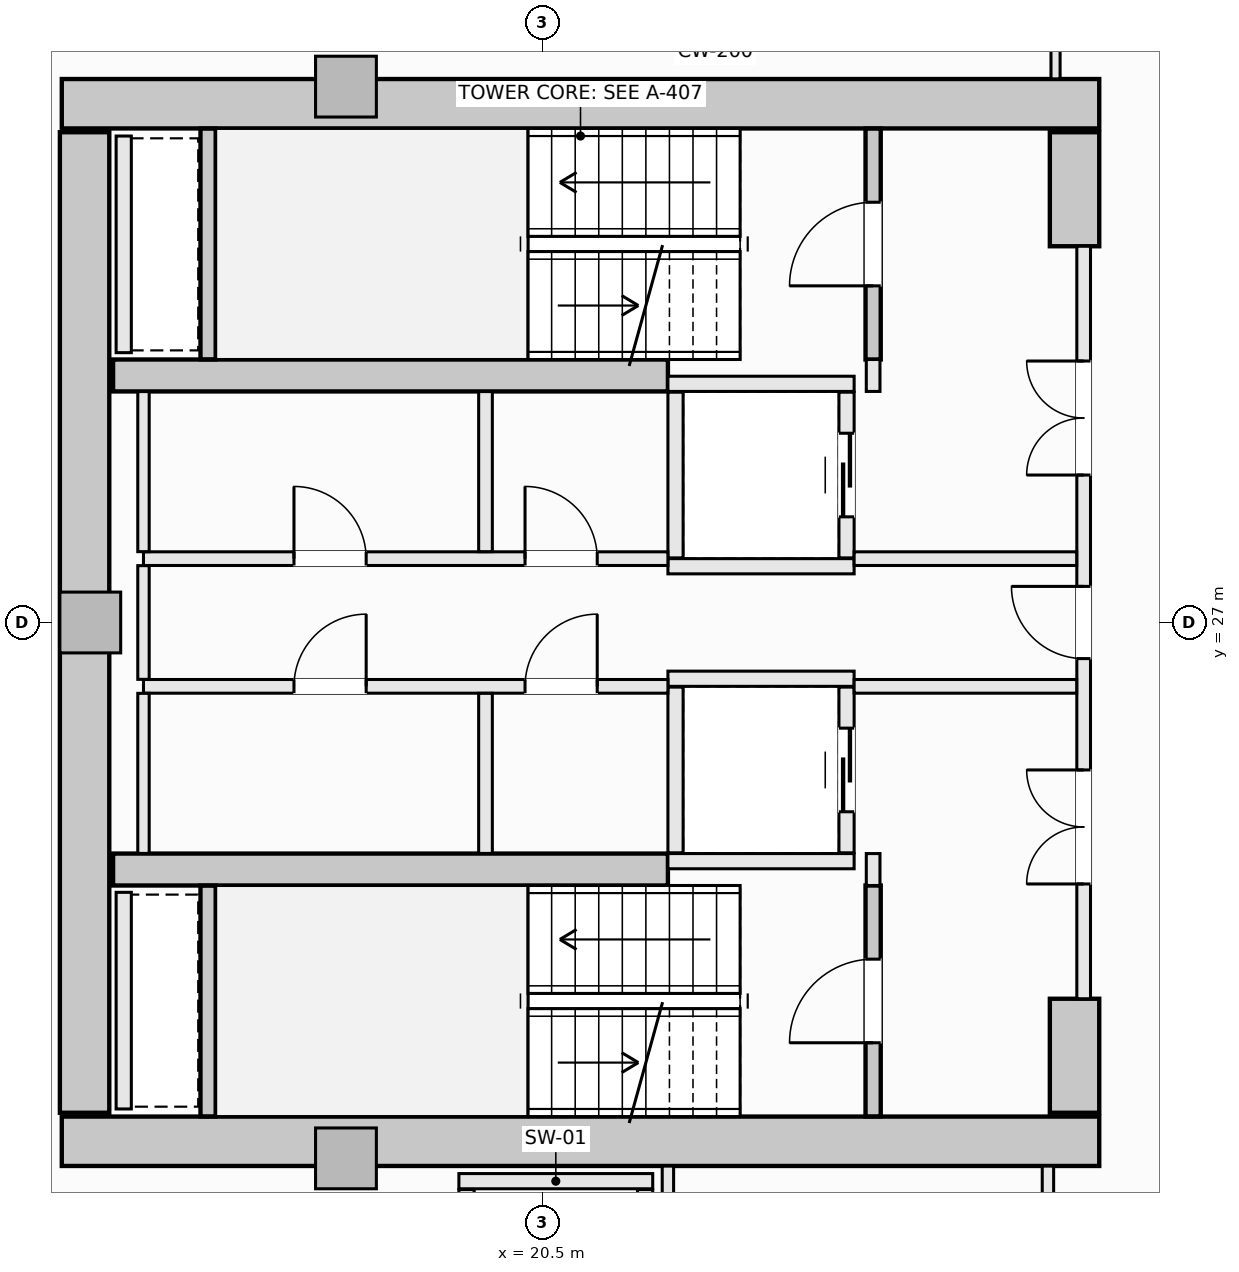
"""IFC4 building model, lengths in metres.
Left out: names, types, materials, properties, quantities, classifications, styles, units other than length and angle.
Written with IfcOpenShell. Run it as: python <this file> out.ifc"""

import sys

from ifc_helpers import new_model, si_unit, direction, frame, frame_2d, origin, origin_2d, place, context, subcontext, project, spatial, rectangle, extrude, element, fill, save


model = new_model("IFC4")
c1 = context("Model", 3, precision=1e-05, world=origin(), true_north=direction((0.0, 1.0)))
c2 = subcontext(c1, "Body", "Model", "MODEL_VIEW")
j1 = project(units=[si_unit("LENGTHUNIT", "METRE"), si_unit("PLANEANGLEUNIT", "RADIAN")], contexts=[c1])
p1 = place(None, origin())
s1 = spatial("IfcSite", under=j1, at=p1, CompositionType="ELEMENT")
p2 = place(p1, origin())
s2 = spatial("IfcBuilding", under=s1, at=p2, CompositionType="ELEMENT")
p3 = place(p2, frame((0.0, 0.0, 105.3)))
s3 = spatial("IfcBuildingStorey", under=s2, at=p3, CompositionType="ELEMENT", Elevation=105.3)
for number, where, z_axis, x_axis in (
    (1, (14.175, 33.825, -0.27), (0.0, 0.0, 1.0), (1.0, 0.0, 0.0)),
    (2, (14.175, 20.175, -0.27), (0.0, 0.0, 1.0), (1.0, 0.0, 0.0)),
):
    element("IfcWall", number, at=place(p3, frame(where, z_axis=z_axis, x_axis=x_axis)), inside=s3, PredefinedType="SHEAR", context=c2, shape_type="SweptSolid", body=[
        extrude(rectangle(XDim=13.65, YDim=0.65, at=frame_2d((6.825, 0.0))), origin(), (0.0, 0.0, 1.0), 3.4),
    ])
p4 = place(p3, frame((14.475, 20.55, -0.27), z_axis=(0.0, 0.0, 1.0), x_axis=(0.0, 1.0, 0.0)))
e3 = element("IfcWall", 3, at=p4, inside=s3, PredefinedType="SHEAR", context=c2, shape_type="SweptSolid", body=[
    extrude(rectangle(XDim=12.9, YDim=0.65, at=frame_2d((6.45, 0.0))), origin(), (0.0, 0.0, 1.0), 3.4),
])
for number, where, z_axis, x_axis in (
    (4, (27.5, 31.95, -0.27), (0.0, 0.0, 1.0), (0.0, 1.0, 0.0)),
    (5, (27.5, 20.55, -0.27), (0.0, 0.0, 1.0), (0.0, 1.0, 0.0)),
):
    element("IfcWall", number, at=place(p3, frame(where, z_axis=z_axis, x_axis=x_axis)), inside=s3, PredefinedType="SHEAR", context=c2, shape_type="SweptSolid", body=[
        extrude(rectangle(XDim=1.5, YDim=0.65, at=frame_2d((0.75, 0.0))), origin(), (0.0, 0.0, 1.0), 3.4),
    ])
for number, where, z_axis, x_axis in (
    (6, (14.85, 30.25, -0.27), (0.0, 0.0, 1.0), (1.0, 0.0, 0.0)),
    (7, (14.85, 23.75, -0.27), (0.0, 0.0, 1.0), (1.0, 0.0, 0.0)),
):
    element("IfcWall", number, at=place(p3, frame(where, z_axis=z_axis, x_axis=x_axis)), inside=s3, PredefinedType="SHEAR", context=c2, shape_type="SweptSolid", body=[
        extrude(rectangle(XDim=7.3, YDim=0.42, at=frame_2d((3.65, 0.0))), origin(), (0.0, 0.0, 1.0), 3.4),
    ])
for number, where, z_axis, x_axis in (
    (8, (17.914, 34.05, -0.27), (0.0, 0.0, 1.0), (1.0, 0.0, 0.0)),
    (9, (14.55, 27.0, -0.27), (0.0, 0.0, 1.0), (1.0, 0.0, 0.0)),
    (10, (17.914, 19.95, -0.27), (0.0, 0.0, 1.0), (1.0, 0.0, 0.0)),
):
    element("IfcColumn", number, at=place(p3, frame(where, z_axis=z_axis, x_axis=x_axis)), inside=s3, PredefinedType="PILASTER", context=c2, shape_type="SweptSolid", body=[
        extrude(rectangle(XDim=0.8, YDim=0.8, at=origin_2d()), origin(), (0.0, 0.0, 1.0), 3.4),
    ])
p5 = place(p3, frame((24.85, 30.46, -0.27), z_axis=(0.0, 0.0, 1.0), x_axis=(0.0, 1.0, 0.0)))
e11 = element("IfcWall", 11, at=p5, inside=s3, PredefinedType="SHEAR", context=c2, shape_type="SweptSolid", body=[
    extrude(rectangle(XDim=3.038, YDim=0.2, at=frame_2d((1.519, 0.0))), origin(), (0.0, 0.0, 1.0), 3.4),
])
p6 = place(p5, frame((0.969, 0.0, 0.27)))
e12 = element("IfcOpeningElement", 12, at=p6, cuts=e11, PredefinedType="OPENING", context=c2, shape_type="SweptSolid", body=[
    extrude(rectangle(XDim=1.1, YDim=2.15, at=frame_2d((0.55, 1.075))), frame((0.0, 0.11, 0.0), z_axis=(0.0, -1.0, 0.0), x_axis=(1.0, 0.0, 0.0)), (0.0, 0.0, 1.0), 0.22),
])
p7 = place(p3, frame((16.1, 30.462, -0.27), z_axis=(0.0, 0.0, 1.0), x_axis=(0.0, 1.0, 0.0)))
e13 = element("IfcWall", 13, at=p7, inside=s3, PredefinedType="SHEAR", context=c2, shape_type="SweptSolid", body=[
    extrude(rectangle(XDim=3.036, YDim=0.2, at=frame_2d((1.518, 0.0))), origin(), (0.0, 0.0, 1.0), 3.4),
])
p8 = place(p3, frame((24.85, 20.502, -0.27), z_axis=(0.0, 0.0, 1.0), x_axis=(0.0, 1.0, 0.0)))
e14 = element("IfcWall", 14, at=p8, inside=s3, PredefinedType="SHEAR", context=c2, shape_type="SweptSolid", body=[
    extrude(rectangle(XDim=3.038, YDim=0.2, at=frame_2d((1.519, 0.0))), origin(), (0.0, 0.0, 1.0), 3.4),
])
p9 = place(p8, frame((0.969, 0.0, 0.27)))
e15 = element("IfcOpeningElement", 15, at=p9, cuts=e14, PredefinedType="OPENING", context=c2, shape_type="SweptSolid", body=[
    extrude(rectangle(XDim=1.1, YDim=2.15, at=frame_2d((0.55, 1.075))), frame((0.0, 0.11, 0.0), z_axis=(0.0, -1.0, 0.0), x_axis=(1.0, 0.0, 0.0)), (0.0, 0.0, 1.0), 0.22),
])
p10 = place(p3, frame((16.1, 20.502, -0.27), z_axis=(0.0, 0.0, 1.0), x_axis=(0.0, 1.0, 0.0)))
e16 = element("IfcWall", 16, at=p10, inside=s3, PredefinedType="SHEAR", context=c2, shape_type="SweptSolid", body=[
    extrude(rectangle(XDim=3.036, YDim=0.2, at=frame_2d((1.518, 0.0))), origin(), (0.0, 0.0, 1.0), 3.4),
])
for number, where, z_axis, x_axis in (
    (17, (22.15, 30.14, 0.0), (0.0, 0.0, 1.0), (1.0, 0.0, 0.0)),
    (18, (22.15, 27.74, 0.0), (0.0, 0.0, 1.0), (1.0, 0.0, 0.0)),
):
    element("IfcWall", number, at=place(p3, frame(where, z_axis=z_axis, x_axis=x_axis)), inside=s3, PredefinedType="SOLIDWALL", context=c2, shape_type="SweptSolid", body=[
        extrude(rectangle(XDim=2.45, YDim=0.2, at=frame_2d((1.225, 0.0))), origin(), (0.0, 0.0, 1.0), 3.13),
    ])
p11 = place(p3, frame((22.25, 27.85, 0.0), z_axis=(0.0, 0.0, 1.0), x_axis=(0.0, 1.0, 0.0)))
e19 = element("IfcWall", 19, at=p11, inside=s3, PredefinedType="SOLIDWALL", context=c2, shape_type="SweptSolid", body=[
    extrude(rectangle(XDim=2.18, YDim=0.2, at=frame_2d((1.09, 0.0))), origin(), (0.0, 0.0, 1.0), 3.13),
])
p12 = place(p3, frame((24.5, 27.85, 0.0), z_axis=(0.0, 0.0, 1.0), x_axis=(0.0, 1.0, 0.0)))
e20 = element("IfcWall", 20, at=p12, inside=s3, PredefinedType="SOLIDWALL", context=c2, shape_type="SweptSolid", body=[
    extrude(rectangle(XDim=2.18, YDim=0.2, at=frame_2d((1.09, 0.0))), origin(), (0.0, 0.0, 1.0), 3.13),
])
p13 = place(p12, frame((0.54, 0.0, 0.0)))
e21 = element("IfcOpeningElement", 21, at=p13, cuts=e20, PredefinedType="OPENING", context=c2, shape_type="SweptSolid", body=[
    extrude(rectangle(XDim=1.1, YDim=2.2, at=frame_2d((0.55, 1.1))), frame((0.0, 0.11, 0.0), z_axis=(0.0, -1.0, 0.0), x_axis=(1.0, 0.0, 0.0)), (0.0, 0.0, 1.0), 0.22),
])
for number, where, z_axis, x_axis in (
    (22, (22.15, 26.26, 0.0), (0.0, 0.0, 1.0), (1.0, 0.0, 0.0)),
    (23, (22.15, 23.86, 0.0), (0.0, 0.0, 1.0), (1.0, 0.0, 0.0)),
):
    element("IfcWall", number, at=place(p3, frame(where, z_axis=z_axis, x_axis=x_axis)), inside=s3, PredefinedType="SOLIDWALL", context=c2, shape_type="SweptSolid", body=[
        extrude(rectangle(XDim=2.45, YDim=0.2, at=frame_2d((1.225, 0.0))), origin(), (0.0, 0.0, 1.0), 3.13),
    ])
p14 = place(p3, frame((22.25, 23.97, 0.0), z_axis=(0.0, 0.0, 1.0), x_axis=(0.0, 1.0, 0.0)))
e24 = element("IfcWall", 24, at=p14, inside=s3, PredefinedType="SOLIDWALL", context=c2, shape_type="SweptSolid", body=[
    extrude(rectangle(XDim=2.18, YDim=0.2, at=frame_2d((1.09, 0.0))), origin(), (0.0, 0.0, 1.0), 3.13),
])
p15 = place(p3, frame((24.5, 23.97, 0.0), z_axis=(0.0, 0.0, 1.0), x_axis=(0.0, 1.0, 0.0)))
e25 = element("IfcWall", 25, at=p15, inside=s3, PredefinedType="SOLIDWALL", context=c2, shape_type="SweptSolid", body=[
    extrude(rectangle(XDim=2.18, YDim=0.2, at=frame_2d((1.09, 0.0))), origin(), (0.0, 0.0, 1.0), 3.13),
])
p16 = place(p15, frame((0.54, 0.0, 0.0)))
e26 = element("IfcOpeningElement", 26, at=p16, cuts=e25, PredefinedType="OPENING", context=c2, shape_type="SweptSolid", body=[
    extrude(rectangle(XDim=1.1, YDim=2.2, at=frame_2d((0.55, 1.1))), frame((0.0, 0.11, 0.0), z_axis=(0.0, -1.0, 0.0), x_axis=(1.0, 0.0, 0.0)), (0.0, 0.0, 1.0), 0.22),
])
p17 = place(p3, frame((19.4, 19.65, 0.0), z_axis=(0.0, 0.0, 1.0), x_axis=(1.0, 0.0, 0.0)))
e27 = element("IfcWall", 27, at=p17, inside=s3, PredefinedType="SOLIDWALL", context=c2, shape_type="SweptSolid", body=[
    extrude(rectangle(XDim=2.55, YDim=0.2, at=frame_2d((1.275, 0.0))), origin(), (0.0, 0.0, 1.0), 3.13),
])
for number, where, z_axis, x_axis in (
    (28, (19.5, 17.01, 0.0), (0.0, 0.0, 1.0), (0.0, 1.0, 0.0)),
    (29, (21.85, 17.01, 0.0), (0.0, 0.0, 1.0), (0.0, 1.0, 0.0)),
):
    element("IfcWall", number, at=place(p3, frame(where, z_axis=z_axis, x_axis=x_axis)), inside=s3, PredefinedType="SOLIDWALL", context=c2, shape_type="SweptSolid", body=[
        extrude(rectangle(XDim=2.53, YDim=0.2, at=frame_2d((1.265, 0.0))), origin(), (0.0, 0.0, 1.0), 3.13),
    ])
for number, where, z_axis, x_axis in (
    (30, (14.99, 30.55, 0.0), (0.0, 0.0, 1.0), (0.0, 1.0, 0.0)),
    (31, (14.99, 20.6, 0.0), (0.0, 0.0, 1.0), (0.0, 1.0, 0.0)),
):
    element("IfcWall", number, at=place(p3, frame(where, z_axis=z_axis, x_axis=x_axis)), inside=s3, PredefinedType="SOLIDWALL", context=c2, shape_type="SweptSolid", body=[
        extrude(rectangle(XDim=2.85, YDim=0.2, at=frame_2d((1.425, 0.0))), origin(), (0.0, 0.0, 1.0), 3.13),
    ])
for number, where, z_axis, x_axis in (
    (32, (24.85, 23.54, 0.0), (0.0, 0.0, 1.0), (0.0, 1.0, 0.0)),
    (33, (24.85, 30.04, 0.0), (0.0, 0.0, 1.0), (0.0, 1.0, 0.0)),
):
    element("IfcWall", number, at=place(p3, frame(where, z_axis=z_axis, x_axis=x_axis)), inside=s3, PredefinedType="SOLIDWALL", context=c2, shape_type="SweptSolid", body=[
        extrude(rectangle(XDim=0.42, YDim=0.18, at=frame_2d((0.21, 0.0))), origin(), (0.0, 0.0, 1.0), 3.13),
    ])
p18 = place(p3, frame((27.62, 22.05, 0.0), z_axis=(0.0, 0.0, 1.0), x_axis=(0.0, 1.0, 0.0)))
e34 = element("IfcWall", 34, at=p18, inside=s3, PredefinedType="SOLIDWALL", context=c2, shape_type="SweptSolid", body=[
    extrude(rectangle(XDim=9.9, YDim=0.18, at=frame_2d((4.95, 0.0))), origin(), (0.0, 0.0, 1.0), 3.13),
])
p19 = place(p18, frame((4.475, 0.0, 0.0)))
e35 = element("IfcOpeningElement", 35, at=p19, cuts=e34, PredefinedType="OPENING", context=c2, shape_type="SweptSolid", body=[
    extrude(rectangle(XDim=0.95, YDim=2.1, at=frame_2d((0.475, 1.05))), frame((0.0, 0.1, 0.0), z_axis=(0.0, -1.0, 0.0), x_axis=(1.0, 0.0, 0.0)), (0.0, 0.0, 1.0), 0.2),
])
p20 = place(p18, frame((6.89, 0.0, 0.0)))
e36 = element("IfcOpeningElement", 36, at=p20, cuts=e34, PredefinedType="OPENING", context=c2, shape_type="SweptSolid", body=[
    extrude(rectangle(XDim=1.5, YDim=2.2, at=frame_2d((0.75, 1.1))), frame((0.0, 0.1, 0.0), z_axis=(0.0, -1.0, 0.0), x_axis=(1.0, 0.0, 0.0)), (0.0, 0.0, 1.0), 0.2),
])
p21 = place(p18, frame((1.51, 0.0, 0.0)))
e37 = element("IfcOpeningElement", 37, at=p21, cuts=e34, PredefinedType="OPENING", context=c2, shape_type="SweptSolid", body=[
    extrude(rectangle(XDim=1.5, YDim=2.2, at=frame_2d((0.75, 1.1))), frame((0.0, 0.1, 0.0), z_axis=(0.0, -1.0, 0.0), x_axis=(1.0, 0.0, 0.0)), (0.0, 0.0, 1.0), 0.2),
])
p22 = place(p3, frame((15.25, 27.84, 0.0), z_axis=(0.0, 0.0, 1.0), x_axis=(1.0, 0.0, 0.0)))
e38 = element("IfcWall", 38, at=p22, inside=s3, PredefinedType="SOLIDWALL", context=c2, shape_type="SweptSolid", body=[
    extrude(rectangle(XDim=6.9, YDim=0.18, at=frame_2d((3.45, 0.0))), origin(), (0.0, 0.0, 1.0), 3.13),
])
p23 = place(p22, frame((5.02, 0.0, 0.0)))
e39 = element("IfcOpeningElement", 39, at=p23, cuts=e38, PredefinedType="OPENING", context=c2, shape_type="SweptSolid", body=[
    extrude(rectangle(XDim=0.95, YDim=2.1, at=frame_2d((0.475, 1.05))), frame((0.0, 0.1, 0.0), z_axis=(0.0, -1.0, 0.0), x_axis=(1.0, 0.0, 0.0)), (0.0, 0.0, 1.0), 0.2),
])
p24 = place(p22, frame((1.98, 0.0, 0.0)))
e40 = element("IfcOpeningElement", 40, at=p24, cuts=e38, PredefinedType="OPENING", context=c2, shape_type="SweptSolid", body=[
    extrude(rectangle(XDim=0.95, YDim=2.1, at=frame_2d((0.475, 1.05))), frame((0.0, 0.1, 0.0), z_axis=(0.0, -1.0, 0.0), x_axis=(1.0, 0.0, 0.0)), (0.0, 0.0, 1.0), 0.2),
])
p25 = place(p3, frame((24.6, 27.84, 0.0), z_axis=(0.0, 0.0, 1.0), x_axis=(1.0, 0.0, 0.0)))
e41 = element("IfcWall", 41, at=p25, inside=s3, PredefinedType="SOLIDWALL", context=c2, shape_type="SweptSolid", body=[
    extrude(rectangle(XDim=2.928, YDim=0.18, at=frame_2d((1.464, 0.0))), origin(), (0.0, 0.0, 1.0), 3.13),
])
p26 = place(p3, frame((15.25, 26.16, 0.0), z_axis=(0.0, 0.0, 1.0), x_axis=(1.0, 0.0, 0.0)))
e42 = element("IfcWall", 42, at=p26, inside=s3, PredefinedType="SOLIDWALL", context=c2, shape_type="SweptSolid", body=[
    extrude(rectangle(XDim=6.9, YDim=0.18, at=frame_2d((3.45, 0.0))), origin(), (0.0, 0.0, 1.0), 3.13),
])
p27 = place(p26, frame((5.02, 0.0, 0.0)))
e43 = element("IfcOpeningElement", 43, at=p27, cuts=e42, PredefinedType="OPENING", context=c2, shape_type="SweptSolid", body=[
    extrude(rectangle(XDim=0.95, YDim=2.1, at=frame_2d((0.475, 1.05))), frame((0.0, 0.1, 0.0), z_axis=(0.0, -1.0, 0.0), x_axis=(1.0, 0.0, 0.0)), (0.0, 0.0, 1.0), 0.2),
])
p28 = place(p26, frame((1.98, 0.0, 0.0)))
e44 = element("IfcOpeningElement", 44, at=p28, cuts=e42, PredefinedType="OPENING", context=c2, shape_type="SweptSolid", body=[
    extrude(rectangle(XDim=0.95, YDim=2.1, at=frame_2d((0.475, 1.05))), frame((0.0, 0.1, 0.0), z_axis=(0.0, -1.0, 0.0), x_axis=(1.0, 0.0, 0.0)), (0.0, 0.0, 1.0), 0.2),
])
p29 = place(p3, frame((24.6, 26.16, 0.0), z_axis=(0.0, 0.0, 1.0), x_axis=(1.0, 0.0, 0.0)))
e45 = element("IfcWall", 45, at=p29, inside=s3, PredefinedType="SOLIDWALL", context=c2, shape_type="SweptSolid", body=[
    extrude(rectangle(XDim=2.928, YDim=0.18, at=frame_2d((1.464, 0.0))), origin(), (0.0, 0.0, 1.0), 3.13),
])
p30 = place(p3, frame((15.25, 23.962, 0.0), z_axis=(0.0, 0.0, 1.0), x_axis=(0.0, 1.0, 0.0)))
e46 = element("IfcWall", 46, at=p30, inside=s3, PredefinedType="PARTITIONING", context=c2, shape_type="SweptSolid", body=[
    extrude(rectangle(XDim=2.106, YDim=0.15, at=frame_2d((1.053, 0.0))), origin(), (0.0, 0.0, 1.0), 3.13),
])
p31 = place(p3, frame((15.25, 26.252, 0.0), z_axis=(0.0, 0.0, 1.0), x_axis=(0.0, 1.0, 0.0)))
e47 = element("IfcWall", 47, at=p31, inside=s3, PredefinedType="PARTITIONING", context=c2, shape_type="SweptSolid", body=[
    extrude(rectangle(XDim=1.496, YDim=0.15, at=frame_2d((0.748, 0.0))), origin(), (0.0, 0.0, 1.0), 3.13),
])
p32 = place(p3, frame((15.25, 27.932, 0.0), z_axis=(0.0, 0.0, 1.0), x_axis=(0.0, 1.0, 0.0)))
e48 = element("IfcWall", 48, at=p32, inside=s3, PredefinedType="PARTITIONING", context=c2, shape_type="SweptSolid", body=[
    extrude(rectangle(XDim=2.106, YDim=0.15, at=frame_2d((1.053, 0.0))), origin(), (0.0, 0.0, 1.0), 3.13),
])
for number, where, z_axis, x_axis in (
    (49, (19.75, 23.962, 0.0), (0.0, 0.0, 1.0), (0.0, 1.0, 0.0)),
    (50, (19.75, 27.932, 0.0), (0.0, 0.0, 1.0), (0.0, 1.0, 0.0)),
):
    element("IfcWall", number, at=place(p3, frame(where, z_axis=z_axis, x_axis=x_axis)), inside=s3, PredefinedType="SOLIDWALL", context=c2, shape_type="SweptSolid", body=[
        extrude(rectangle(XDim=2.106, YDim=0.18, at=frame_2d((1.053, 0.0))), origin(), (0.0, 0.0, 1.0), 3.13),
    ])
for number, where, z_axis, x_axis in (
    (51, (22.15, 17.127, 0.0), (0.0, 0.0, 1.0), (0.0, 1.0, 0.0)),
    (52, (27.15, 17.127, 0.0), (0.0, 0.0, 1.0), (0.0, 1.0, 0.0)),
):
    element("IfcWall", number, at=place(p3, frame(where, z_axis=z_axis, x_axis=x_axis)), inside=s3, PredefinedType="PARTITIONING", context=c2, shape_type="SweptSolid", body=[
        extrude(rectangle(XDim=2.721, YDim=0.15, at=frame_2d((1.36, 0.0))), origin(), (0.0, 0.0, 1.0), 3.13),
    ])
p33 = place(p3, frame((27.25, 34.152, 0.0), z_axis=(0.0, 0.0, 1.0), x_axis=(0.0, 1.0, 0.0)))
e53 = element("IfcWall", 53, at=p33, inside=s3, PredefinedType="PARTITIONING", context=c2, shape_type="SweptSolid", body=[
    extrude(rectangle(XDim=0.806, YDim=0.12, at=frame_2d((0.403, 0.0))), origin(), (0.0, 0.0, 1.0), 3.13),
])
p34 = place(p6, origin())
e54 = element("IfcDoor", 54, at=p34, inside=s3, OperationType="SINGLE_SWING_LEFT", PredefinedType="DOOR", context=c2, shape_type="SweptSolid", body=[
    extrude(rectangle(XDim=1.1, YDim=2.15, at=frame_2d((0.55, 1.075))), frame((0.0, 0.025, 0.0), z_axis=(0.0, -1.0, 0.0), x_axis=(1.0, 0.0, 0.0)), (0.0, 0.0, 1.0), 0.05),
])
fill(e12, e54)
p35 = place(p9, origin())
e55 = element("IfcDoor", 55, at=p35, inside=s3, OperationType="SINGLE_SWING_LEFT", PredefinedType="DOOR", context=c2, shape_type="SweptSolid", body=[
    extrude(rectangle(XDim=1.1, YDim=2.15, at=frame_2d((0.55, 1.075))), frame((0.0, 0.025, 0.0), z_axis=(0.0, -1.0, 0.0), x_axis=(1.0, 0.0, 0.0)), (0.0, 0.0, 1.0), 0.05),
])
fill(e15, e55)
p36 = place(p13, origin())
e56 = element("IfcDoor", 56, at=p36, inside=s3, OperationType="SLIDING_TO_LEFT", PredefinedType="DOOR", context=c2, shape_type="SweptSolid", body=[
    extrude(rectangle(XDim=1.1, YDim=2.2, at=frame_2d((0.55, 1.1))), frame((0.0, 0.025, 0.0), z_axis=(0.0, -1.0, 0.0), x_axis=(1.0, 0.0, 0.0)), (0.0, 0.0, 1.0), 0.05),
])
fill(e21, e56)
p37 = place(p16, origin())
e57 = element("IfcDoor", 57, at=p37, inside=s3, OperationType="SLIDING_TO_LEFT", PredefinedType="DOOR", context=c2, shape_type="SweptSolid", body=[
    extrude(rectangle(XDim=1.1, YDim=2.2, at=frame_2d((0.55, 1.1))), frame((0.0, 0.025, 0.0), z_axis=(0.0, -1.0, 0.0), x_axis=(1.0, 0.0, 0.0)), (0.0, 0.0, 1.0), 0.05),
])
fill(e26, e57)
p38 = place(p19, origin())
e58 = element("IfcDoor", 58, at=p38, inside=s3, OperationType="SINGLE_SWING_RIGHT", PredefinedType="DOOR", context=c2, shape_type="SweptSolid", body=[
    extrude(rectangle(XDim=0.95, YDim=2.1, at=frame_2d((0.475, 1.05))), frame((0.0, 0.025, 0.0), z_axis=(0.0, -1.0, 0.0), x_axis=(1.0, 0.0, 0.0)), (0.0, 0.0, 1.0), 0.05),
])
fill(e35, e58)
p39 = place(p20, origin())
e59 = element("IfcDoor", 59, at=p39, inside=s3, OperationType="DOUBLE_DOOR_SINGLE_SWING", PredefinedType="DOOR", context=c2, shape_type="SweptSolid", body=[
    extrude(rectangle(XDim=1.5, YDim=2.2, at=frame_2d((0.75, 1.1))), frame((0.0, 0.025, 0.0), z_axis=(0.0, -1.0, 0.0), x_axis=(1.0, 0.0, 0.0)), (0.0, 0.0, 1.0), 0.05),
])
fill(e36, e59)
p40 = place(p21, origin())
e60 = element("IfcDoor", 60, at=p40, inside=s3, OperationType="DOUBLE_DOOR_SINGLE_SWING", PredefinedType="DOOR", context=c2, shape_type="SweptSolid", body=[
    extrude(rectangle(XDim=1.5, YDim=2.2, at=frame_2d((0.75, 1.1))), frame((0.0, 0.025, 0.0), z_axis=(0.0, -1.0, 0.0), x_axis=(1.0, 0.0, 0.0)), (0.0, 0.0, 1.0), 0.05),
])
fill(e37, e60)
p41 = place(p23, origin())
e61 = element("IfcDoor", 61, at=p41, inside=s3, OperationType="SINGLE_SWING_LEFT", PredefinedType="DOOR", context=c2, shape_type="SweptSolid", body=[
    extrude(rectangle(XDim=0.95, YDim=2.1, at=frame_2d((0.475, 1.05))), frame((0.0, 0.025, 0.0), z_axis=(0.0, -1.0, 0.0), x_axis=(1.0, 0.0, 0.0)), (0.0, 0.0, 1.0), 0.05),
])
fill(e39, e61)
p42 = place(p27, origin())
e62 = element("IfcDoor", 62, at=p42, inside=s3, OperationType="SINGLE_SWING_RIGHT", PredefinedType="DOOR", context=c2, shape_type="SweptSolid", body=[
    extrude(rectangle(XDim=0.95, YDim=2.1, at=frame_2d((0.475, 1.05))), frame((0.0, 0.025, 0.0), z_axis=(0.0, -1.0, 0.0), x_axis=(1.0, 0.0, 0.0)), (0.0, 0.0, 1.0), 0.05),
])
fill(e43, e62)
p43 = place(p24, origin())
e63 = element("IfcDoor", 63, at=p43, inside=s3, OperationType="SINGLE_SWING_LEFT", PredefinedType="DOOR", context=c2, shape_type="SweptSolid", body=[
    extrude(rectangle(XDim=0.95, YDim=2.1, at=frame_2d((0.475, 1.05))), frame((0.0, 0.025, 0.0), z_axis=(0.0, -1.0, 0.0), x_axis=(1.0, 0.0, 0.0)), (0.0, 0.0, 1.0), 0.05),
])
fill(e40, e63)
p44 = place(p28, origin())
e64 = element("IfcDoor", 64, at=p44, inside=s3, OperationType="SINGLE_SWING_RIGHT", PredefinedType="DOOR", context=c2, shape_type="SweptSolid", body=[
    extrude(rectangle(XDim=0.95, YDim=2.1, at=frame_2d((0.475, 1.05))), frame((0.0, 0.025, 0.0), z_axis=(0.0, -1.0, 0.0), x_axis=(1.0, 0.0, 0.0)), (0.0, 0.0, 1.0), 0.05),
])
fill(e44, e64)
save(model, sys.argv[1])
